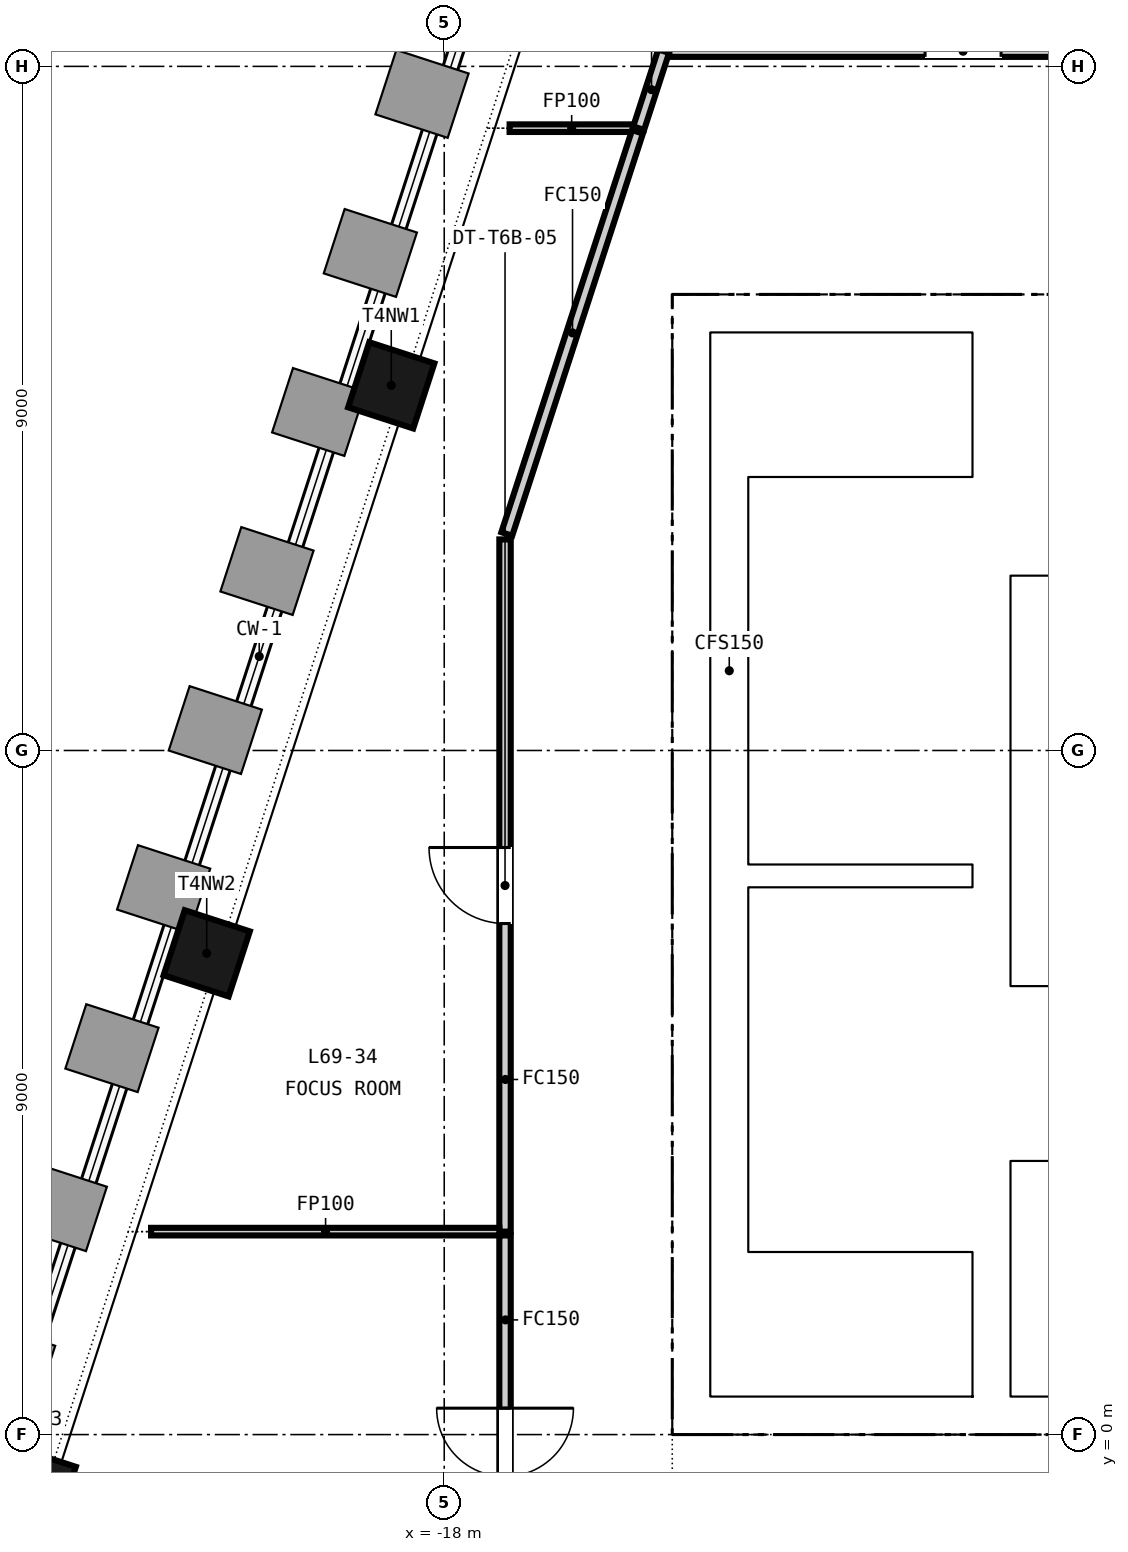
"""IFC4 building model, lengths in metres.
Left out: names, types, materials, properties, quantities, classifications, styles, units other than length and angle.
Written with IfcOpenShell. Run it as: python <this file> out.ifc"""

import sys

from ifc_helpers import new_model, si_unit, direction, frame, frame_2d, origin, origin_2d, place, context, subcontext, project, spatial, rectangle, extrude, element, fill, save


model = new_model("IFC4")
c1 = context("Model", 3, precision=1e-05, world=origin(), true_north=direction((0.0, 1.0)))
c2 = subcontext(c1, "Body", "Model", "MODEL_VIEW")
j1 = project(units=[si_unit("LENGTHUNIT", "METRE"), si_unit("PLANEANGLEUNIT", "RADIAN")], contexts=[c1])
p1 = place(None, origin())
s1 = spatial("IfcSite", under=j1, at=p1, CompositionType="ELEMENT")
p2 = place(p1, origin())
s2 = spatial("IfcBuilding", under=s1, at=p2, CompositionType="ELEMENT")
p3 = place(p2, frame((0.0, 0.0, 271.9)))
s3 = spatial("IfcBuildingStorey", under=s2, at=p3, CompositionType="ELEMENT", Elevation=271.9)
p4 = place(p3, frame((-15.0, 0.25, -0.15), z_axis=(0.0, 0.0, 1.0), x_axis=(1.0, 0.0, 0.0)))
e1 = element("IfcWall", 1, at=p4, inside=s3, PredefinedType="SOLIDWALL", context=c2, shape_type="SweptSolid", body=[
    extrude(rectangle(XDim=30.0, YDim=0.5, at=frame_2d((15.0, 0.0))), origin(), (0.0, 0.0, 1.0), 3.65),
])
p5 = place(p4, frame((5.8, 0.0, 0.15)))
e2 = element("IfcOpeningElement", 2, at=p5, cuts=e1, PredefinedType="OPENING", context=c2, shape_type="SweptSolid", body=[
    extrude(rectangle(XDim=2.4, YDim=2.4, at=frame_2d((1.2, 1.2))), frame((0.0, 0.26, 0.0), z_axis=(0.0, -1.0, 0.0), x_axis=(1.0, 0.0, 0.0)), (0.0, 0.0, 1.0), 0.52),
])
p6 = place(p4, frame((13.8, 0.0, 0.15)))
e3 = element("IfcOpeningElement", 3, at=p6, cuts=e1, PredefinedType="OPENING", context=c2, shape_type="SweptSolid", body=[
    extrude(rectangle(XDim=2.4, YDim=2.4, at=frame_2d((1.2, 1.2))), frame((0.0, 0.26, 0.0), z_axis=(0.0, -1.0, 0.0), x_axis=(1.0, 0.0, 0.0)), (0.0, 0.0, 1.0), 0.52),
])
p7 = place(p4, frame((21.8, 0.0, 0.15)))
e4 = element("IfcOpeningElement", 4, at=p7, cuts=e1, PredefinedType="OPENING", context=c2, shape_type="SweptSolid", body=[
    extrude(rectangle(XDim=2.4, YDim=2.4, at=frame_2d((1.2, 1.2))), frame((0.0, 0.26, 0.0), z_axis=(0.0, -1.0, 0.0), x_axis=(1.0, 0.0, 0.0)), (0.0, 0.0, 1.0), 0.52),
])
p8 = place(p4, frame((1.5, 0.0, 0.15)))
e5 = element("IfcOpeningElement", 5, at=p8, cuts=e1, PredefinedType="OPENING", context=c2, shape_type="SweptSolid", body=[
    extrude(rectangle(XDim=1.2, YDim=2.1, at=frame_2d((0.6, 1.05))), frame((0.0, 0.26, 0.0), z_axis=(0.0, -1.0, 0.0), x_axis=(1.0, 0.0, 0.0)), (0.0, 0.0, 1.0), 0.52),
])
p9 = place(p4, frame((27.3, 0.0, 0.15)))
e6 = element("IfcOpeningElement", 6, at=p9, cuts=e1, PredefinedType="OPENING", context=c2, shape_type="SweptSolid", body=[
    extrude(rectangle(XDim=1.2, YDim=2.1, at=frame_2d((0.6, 1.05))), frame((0.0, 0.26, 0.0), z_axis=(0.0, -1.0, 0.0), x_axis=(1.0, 0.0, 0.0)), (0.0, 0.0, 1.0), 0.52),
])
p10 = place(p3, frame((-15.0, 14.75, -0.15), z_axis=(0.0, 0.0, 1.0), x_axis=(1.0, 0.0, 0.0)))
e7 = element("IfcWall", 7, at=p10, inside=s3, PredefinedType="SOLIDWALL", context=c2, shape_type="SweptSolid", body=[
    extrude(rectangle(XDim=30.0, YDim=0.5, at=frame_2d((15.0, 0.0))), origin(), (0.0, 0.0, 1.0), 3.65),
])
p11 = place(p10, frame((9.25, 0.0, 0.15)))
e8 = element("IfcOpeningElement", 8, at=p11, cuts=e7, PredefinedType="OPENING", context=c2, shape_type="SweptSolid", body=[
    extrude(rectangle(XDim=1.5, YDim=2.1, at=frame_2d((0.75, 1.05))), frame((0.0, 0.26, 0.0), z_axis=(0.0, -1.0, 0.0), x_axis=(1.0, 0.0, 0.0)), (0.0, 0.0, 1.0), 0.52),
])
p12 = place(p10, frame((19.4, 0.0, 0.15)))
e9 = element("IfcOpeningElement", 9, at=p12, cuts=e7, PredefinedType="OPENING", context=c2, shape_type="SweptSolid", body=[
    extrude(rectangle(XDim=1.5, YDim=2.1, at=frame_2d((0.75, 1.05))), frame((0.0, 0.26, 0.0), z_axis=(0.0, -1.0, 0.0), x_axis=(1.0, 0.0, 0.0)), (0.0, 0.0, 1.0), 0.52),
])
p13 = place(p10, frame((1.5, 0.0, 0.15)))
e10 = element("IfcOpeningElement", 10, at=p13, cuts=e7, PredefinedType="OPENING", context=c2, shape_type="SweptSolid", body=[
    extrude(rectangle(XDim=1.2, YDim=2.1, at=frame_2d((0.6, 1.05))), frame((0.0, 0.26, 0.0), z_axis=(0.0, -1.0, 0.0), x_axis=(1.0, 0.0, 0.0)), (0.0, 0.0, 1.0), 0.52),
])
p14 = place(p10, frame((27.3, 0.0, 0.15)))
e11 = element("IfcOpeningElement", 11, at=p14, cuts=e7, PredefinedType="OPENING", context=c2, shape_type="SweptSolid", body=[
    extrude(rectangle(XDim=1.2, YDim=2.1, at=frame_2d((0.6, 1.05))), frame((0.0, 0.26, 0.0), z_axis=(0.0, -1.0, 0.0), x_axis=(1.0, 0.0, 0.0)), (0.0, 0.0, 1.0), 0.52),
])
for number, where, z_axis, x_axis in (
    (12, (-14.75, 0.5, -0.15), (0.0, 0.0, 1.0), (0.0, 1.0, 0.0)),
    (13, (-10.8, 0.5, -0.15), (0.0, 0.0, 1.0), (0.0, 1.0, 0.0)),
):
    element("IfcWall", number, at=place(p3, frame(where, z_axis=z_axis, x_axis=x_axis)), inside=s3, PredefinedType="SOLIDWALL", context=c2, shape_type="SweptSolid", body=[
        extrude(rectangle(XDim=14.0, YDim=0.5, at=frame_2d((7.0, 0.0))), origin(), (0.0, 0.0, 1.0), 3.65),
    ])
for number, where, z_axis, x_axis in (
    (14, (-18.697, 13.804, -0.15), (0.0, 0.0, 1.0), (-0.309, -0.951, 0.0)),
    (15, (-21.125, 6.331, -0.15), (0.0, 0.0, 1.0), (-0.309, -0.951, 0.0)),
    (16, (-23.414, -0.713, -0.15), (0.0, 0.0, 1.0), (-0.309, -0.951, 0.0)),
):
    element("IfcColumn", number, at=place(p3, frame(where, z_axis=z_axis, x_axis=x_axis)), inside=s3, PredefinedType="COLUMN", context=c2, shape_type="SweptSolid", body=[
        extrude(rectangle(XDim=0.9, YDim=0.9, at=origin_2d()), origin(), (0.0, 0.0, 1.0), 3.65),
    ])
p15 = place(p3, frame((-10.55, 3.5, 0.0), z_axis=(0.0, 0.0, 1.0), x_axis=(1.0, 0.0, 0.0)))
e17 = element("IfcWall", 17, at=p15, inside=s3, PredefinedType="PARTITIONING", context=c2, shape_type="SweptSolid", body=[
    extrude(rectangle(XDim=21.1, YDim=0.2, at=frame_2d((10.55, 0.0))), origin(), (0.0, 0.0, 1.0), 3.5),
])
p16 = place(p15, frame((0.675, 0.0, 0.0)))
e18 = element("IfcOpeningElement", 18, at=p16, cuts=e17, PredefinedType="OPENING", context=c2, shape_type="SweptSolid", body=[
    extrude(rectangle(XDim=1.2, YDim=2.1, at=frame_2d((0.6, 1.05))), frame((0.0, 0.11, 0.0), z_axis=(0.0, -1.0, 0.0), x_axis=(1.0, 0.0, 0.0)), (0.0, 0.0, 1.0), 0.22),
])
p17 = place(p15, frame((3.475, 0.0, 0.0)))
e19 = element("IfcOpeningElement", 19, at=p17, cuts=e17, PredefinedType="OPENING", context=c2, shape_type="SweptSolid", body=[
    extrude(rectangle(XDim=1.2, YDim=2.1, at=frame_2d((0.6, 1.05))), frame((0.0, 0.11, 0.0), z_axis=(0.0, -1.0, 0.0), x_axis=(1.0, 0.0, 0.0)), (0.0, 0.0, 1.0), 0.22),
])
p18 = place(p15, frame((6.275, 0.0, 0.0)))
e20 = element("IfcOpeningElement", 20, at=p18, cuts=e17, PredefinedType="OPENING", context=c2, shape_type="SweptSolid", body=[
    extrude(rectangle(XDim=1.2, YDim=2.1, at=frame_2d((0.6, 1.05))), frame((0.0, 0.11, 0.0), z_axis=(0.0, -1.0, 0.0), x_axis=(1.0, 0.0, 0.0)), (0.0, 0.0, 1.0), 0.22),
])
p19 = place(p15, frame((9.075, 0.0, 0.0)))
e21 = element("IfcOpeningElement", 21, at=p19, cuts=e17, PredefinedType="OPENING", context=c2, shape_type="SweptSolid", body=[
    extrude(rectangle(XDim=1.2, YDim=2.1, at=frame_2d((0.6, 1.05))), frame((0.0, 0.11, 0.0), z_axis=(0.0, -1.0, 0.0), x_axis=(1.0, 0.0, 0.0)), (0.0, 0.0, 1.0), 0.22),
])
p20 = place(p15, frame((11.875, 0.0, 0.0)))
e22 = element("IfcOpeningElement", 22, at=p20, cuts=e17, PredefinedType="OPENING", context=c2, shape_type="SweptSolid", body=[
    extrude(rectangle(XDim=1.2, YDim=2.1, at=frame_2d((0.6, 1.05))), frame((0.0, 0.11, 0.0), z_axis=(0.0, -1.0, 0.0), x_axis=(1.0, 0.0, 0.0)), (0.0, 0.0, 1.0), 0.22),
])
p21 = place(p15, frame((14.675, 0.0, 0.0)))
e23 = element("IfcOpeningElement", 23, at=p21, cuts=e17, PredefinedType="OPENING", context=c2, shape_type="SweptSolid", body=[
    extrude(rectangle(XDim=1.2, YDim=2.1, at=frame_2d((0.6, 1.05))), frame((0.0, 0.11, 0.0), z_axis=(0.0, -1.0, 0.0), x_axis=(1.0, 0.0, 0.0)), (0.0, 0.0, 1.0), 0.22),
])
p22 = place(p15, frame((17.475, 0.0, 0.0)))
e24 = element("IfcOpeningElement", 24, at=p22, cuts=e17, PredefinedType="OPENING", context=c2, shape_type="SweptSolid", body=[
    extrude(rectangle(XDim=1.2, YDim=2.1, at=frame_2d((0.6, 1.05))), frame((0.0, 0.11, 0.0), z_axis=(0.0, -1.0, 0.0), x_axis=(1.0, 0.0, 0.0)), (0.0, 0.0, 1.0), 0.22),
])
p23 = place(p15, frame((19.9, 0.0, 0.0)))
e25 = element("IfcOpeningElement", 25, at=p23, cuts=e17, PredefinedType="OPENING", context=c2, shape_type="SweptSolid", body=[
    extrude(rectangle(XDim=0.9, YDim=2.1, at=frame_2d((0.45, 1.05))), frame((0.0, 0.11, 0.0), z_axis=(0.0, -1.0, 0.0), x_axis=(1.0, 0.0, 0.0)), (0.0, 0.0, 1.0), 0.22),
])
p24 = place(p3, frame((-10.55, 6.025, 0.0), z_axis=(0.0, 0.0, 1.0), x_axis=(1.0, 0.0, 0.0)))
e26 = element("IfcWall", 26, at=p24, inside=s3, PredefinedType="PARTITIONING", context=c2, shape_type="SweptSolid", body=[
    extrude(rectangle(XDim=21.1, YDim=0.25, at=frame_2d((10.55, 0.0))), origin(), (0.0, 0.0, 1.0), 3.5),
])
p25 = place(p3, frame((-10.55, 11.2, 0.0), z_axis=(0.0, 0.0, 1.0), x_axis=(1.0, 0.0, 0.0)))
e27 = element("IfcWall", 27, at=p25, inside=s3, PredefinedType="PARTITIONING", context=c2, shape_type="SweptSolid", body=[
    extrude(rectangle(XDim=4.8, YDim=0.2, at=frame_2d((2.4, 0.0))), origin(), (0.0, 0.0, 1.0), 3.5),
])
p26 = place(p25, frame((0.525, 0.0, 0.0)))
e28 = element("IfcOpeningElement", 28, at=p26, cuts=e27, PredefinedType="OPENING", context=c2, shape_type="SweptSolid", body=[
    extrude(rectangle(XDim=1.1, YDim=2.1, at=frame_2d((0.55, 1.05))), frame((0.0, 0.11, 0.0), z_axis=(0.0, -1.0, 0.0), x_axis=(1.0, 0.0, 0.0)), (0.0, 0.0, 1.0), 0.22),
])
p27 = place(p25, frame((2.925, 0.0, 0.0)))
e29 = element("IfcOpeningElement", 29, at=p27, cuts=e27, PredefinedType="OPENING", context=c2, shape_type="SweptSolid", body=[
    extrude(rectangle(XDim=1.1, YDim=2.1, at=frame_2d((0.55, 1.05))), frame((0.0, 0.11, 0.0), z_axis=(0.0, -1.0, 0.0), x_axis=(1.0, 0.0, 0.0)), (0.0, 0.0, 1.0), 0.22),
])
p28 = place(p3, frame((-14.0, 7.35, 0.0), z_axis=(0.0, 0.0, 1.0), x_axis=(1.0, 0.0, 0.0)))
e30 = element("IfcWall", 30, at=p28, inside=s3, PredefinedType="SOLIDWALL", context=c2, shape_type="SweptSolid", body=[
    extrude(rectangle(XDim=2.95, YDim=0.3, at=frame_2d((1.475, 0.0))), origin(), (0.0, 0.0, 1.0), 3.5),
])
p29 = place(p3, frame((-14.25, 0.5, 0.0), z_axis=(0.0, 0.0, 1.0), x_axis=(0.0, 1.0, 0.0)))
e31 = element("IfcWall", 31, at=p29, inside=s3, PredefinedType="SOLIDWALL", context=c2, shape_type="SweptSolid", body=[
    extrude(rectangle(XDim=14.0, YDim=0.5, at=frame_2d((7.0, 0.0))), origin(), (0.0, 0.0, 1.0), 3.5),
])
p30 = place(p3, frame((-15.442, 17.187, 0.0), z_axis=(0.0, 0.0, 1.0), x_axis=(0.308790594164, 0.951130048393, 0.0)))
e32 = element("IfcWall", 32, at=p30, inside=s3, PredefinedType="PARTITIONING", context=c2, shape_type="SweptSolid", body=[
    extrude(rectangle(XDim=1.065, YDim=0.15, at=frame_2d((0.532, 0.0))), origin(), (0.0, 0.0, 1.0), 2.751),
])
p31 = place(p3, frame((-15.038, 18.2, 0.0), z_axis=(0.0, 0.0, 1.0), x_axis=(1.0, 0.0, 0.0)))
e33 = element("IfcWall", 33, at=p31, inside=s3, PredefinedType="PARTITIONING", context=c2, shape_type="SweptSolid", body=[
    extrude(rectangle(XDim=7.728, YDim=0.15, at=frame_2d((3.864, 0.0))), origin(), (0.0, 0.0, 1.0), 2.751),
])
p32 = place(p31, frame((3.364, 0.0, 0.0)))
e34 = element("IfcOpeningElement", 34, at=p32, cuts=e33, PredefinedType="OPENING", context=c2, shape_type="SweptSolid", body=[
    extrude(rectangle(XDim=1.0, YDim=2.1, at=frame_2d((0.5, 1.05))), frame((0.0, 0.085, 0.0), z_axis=(0.0, -1.0, 0.0), x_axis=(1.0, 0.0, 0.0)), (0.0, 0.0, 1.0), 0.17),
])
p33 = place(p3, frame((-17.14, 17.187, 0.0), z_axis=(0.0, 0.0, 1.0), x_axis=(1.0, 0.0, 0.0)))
e35 = element("IfcWall", 35, at=p33, inside=s3, PredefinedType="PARTITIONING", context=c2, shape_type="SweptSolid", body=[
    extrude(rectangle(XDim=1.623, YDim=0.1, at=frame_2d((0.812, 0.0))), origin(), (0.0, 0.0, 1.0), 2.751),
])
p34 = place(p3, frame((-17.2, 2.67, 0.0), z_axis=(0.0, 0.0, 1.0), x_axis=(0.0, 1.0, 0.0)))
e36 = element("IfcWall", 36, at=p34, inside=s3, PredefinedType="PARTITIONING", context=c2, shape_type="SweptSolid", body=[
    extrude(rectangle(XDim=9.107, YDim=0.15, at=frame_2d((4.554, 0.0))), origin(), (0.0, 0.0, 1.0), 2.751),
])
p35 = place(p34, frame((4.053, 0.0, 0.0)))
e37 = element("IfcOpeningElement", 37, at=p35, cuts=e36, PredefinedType="OPENING", context=c2, shape_type="SweptSolid", body=[
    extrude(rectangle(XDim=1.0, YDim=2.1, at=frame_2d((0.5, 1.05))), frame((0.0, 0.085, 0.0), z_axis=(0.0, -1.0, 0.0), x_axis=(1.0, 0.0, 0.0)), (0.0, 0.0, 1.0), 0.17),
])
p36 = place(p3, frame((-17.177, 11.848, 0.0), z_axis=(0.0, 0.0, 1.0), x_axis=(0.309030503714, 0.951052126739, 0.0)))
e38 = element("IfcWall", 38, at=p36, inside=s3, PredefinedType="PARTITIONING", context=c2, shape_type="SweptSolid", body=[
    extrude(rectangle(XDim=5.563, YDim=0.15, at=frame_2d((2.782, 0.0))), origin(), (0.0, 0.0, 1.0), 2.751),
])
p37 = place(p3, frame((-21.857, 2.67, 0.0), z_axis=(0.0, 0.0, 1.0), x_axis=(1.0, 0.0, 0.0)))
e39 = element("IfcWall", 39, at=p37, inside=s3, PredefinedType="PARTITIONING", context=c2, shape_type="SweptSolid", body=[
    extrude(rectangle(XDim=4.582, YDim=0.1, at=frame_2d((2.291, 0.0))), origin(), (0.0, 0.0, 1.0), 2.751),
])
p38 = place(p3, frame((-17.2, -3.725, 0.0), z_axis=(0.0, 0.0, 1.0), x_axis=(0.0, 1.0, 0.0)))
e40 = element("IfcWall", 40, at=p38, inside=s3, PredefinedType="PARTITIONING", context=c2, shape_type="SweptSolid", body=[
    extrude(rectangle(XDim=6.345, YDim=0.15, at=frame_2d((3.173, 0.0))), origin(), (0.0, 0.0, 1.0), 2.751),
])
p39 = place(p38, frame((2.272, 0.0, 0.0)))
e41 = element("IfcOpeningElement", 41, at=p39, cuts=e40, PredefinedType="OPENING", context=c2, shape_type="SweptSolid", body=[
    extrude(rectangle(XDim=1.8, YDim=2.1, at=frame_2d((0.9, 1.05))), frame((0.0, 0.085, 0.0), z_axis=(0.0, -1.0, 0.0), x_axis=(1.0, 0.0, 0.0)), (0.0, 0.0, 1.0), 0.17),
])
p40 = place(p13, origin())
e42 = element("IfcDoor", 42, at=p40, inside=s3, OperationType="SINGLE_SWING_RIGHT", PredefinedType="DOOR", context=c2, shape_type="SweptSolid", body=[
    extrude(rectangle(XDim=1.2, YDim=2.1, at=frame_2d((0.6, 1.05))), frame((0.0, 0.025, 0.0), z_axis=(0.0, -1.0, 0.0), x_axis=(1.0, 0.0, 0.0)), (0.0, 0.0, 1.0), 0.05),
])
fill(e10, e42)
p41 = place(p8, origin())
e43 = element("IfcDoor", 43, at=p41, inside=s3, OperationType="SINGLE_SWING_LEFT", PredefinedType="DOOR", context=c2, shape_type="SweptSolid", body=[
    extrude(rectangle(XDim=1.2, YDim=2.1, at=frame_2d((0.6, 1.05))), frame((0.0, 0.025, 0.0), z_axis=(0.0, -1.0, 0.0), x_axis=(1.0, 0.0, 0.0)), (0.0, 0.0, 1.0), 0.05),
])
fill(e5, e43)
p42 = place(p32, origin())
e44 = element("IfcDoor", 44, at=p42, inside=s3, OperationType="SINGLE_SWING_RIGHT", PredefinedType="DOOR", context=c2, shape_type="SweptSolid", body=[
    extrude(rectangle(XDim=1.0, YDim=2.1, at=frame_2d((0.5, 1.05))), frame((0.0, 0.025, 0.0), z_axis=(0.0, -1.0, 0.0), x_axis=(1.0, 0.0, 0.0)), (0.0, 0.0, 1.0), 0.05),
])
fill(e34, e44)
p43 = place(p35, origin())
e45 = element("IfcDoor", 45, at=p43, inside=s3, OperationType="SINGLE_SWING_RIGHT", PredefinedType="DOOR", context=c2, shape_type="SweptSolid", body=[
    extrude(rectangle(XDim=1.0, YDim=2.1, at=frame_2d((0.5, 1.05))), frame((0.0, 0.025, 0.0), z_axis=(0.0, -1.0, 0.0), x_axis=(1.0, 0.0, 0.0)), (0.0, 0.0, 1.0), 0.05),
])
fill(e37, e45)
p44 = place(p39, origin())
e46 = element("IfcDoor", 46, at=p44, inside=s3, OperationType="DOUBLE_DOOR_DOUBLE_SWING", PredefinedType="DOOR", context=c2, shape_type="SweptSolid", body=[
    extrude(rectangle(XDim=1.8, YDim=2.1, at=frame_2d((0.9, 1.05))), frame((0.0, 0.025, 0.0), z_axis=(0.0, -1.0, 0.0), x_axis=(1.0, 0.0, 0.0)), (0.0, 0.0, 1.0), 0.05),
])
fill(e41, e46)
save(model, sys.argv[1])
